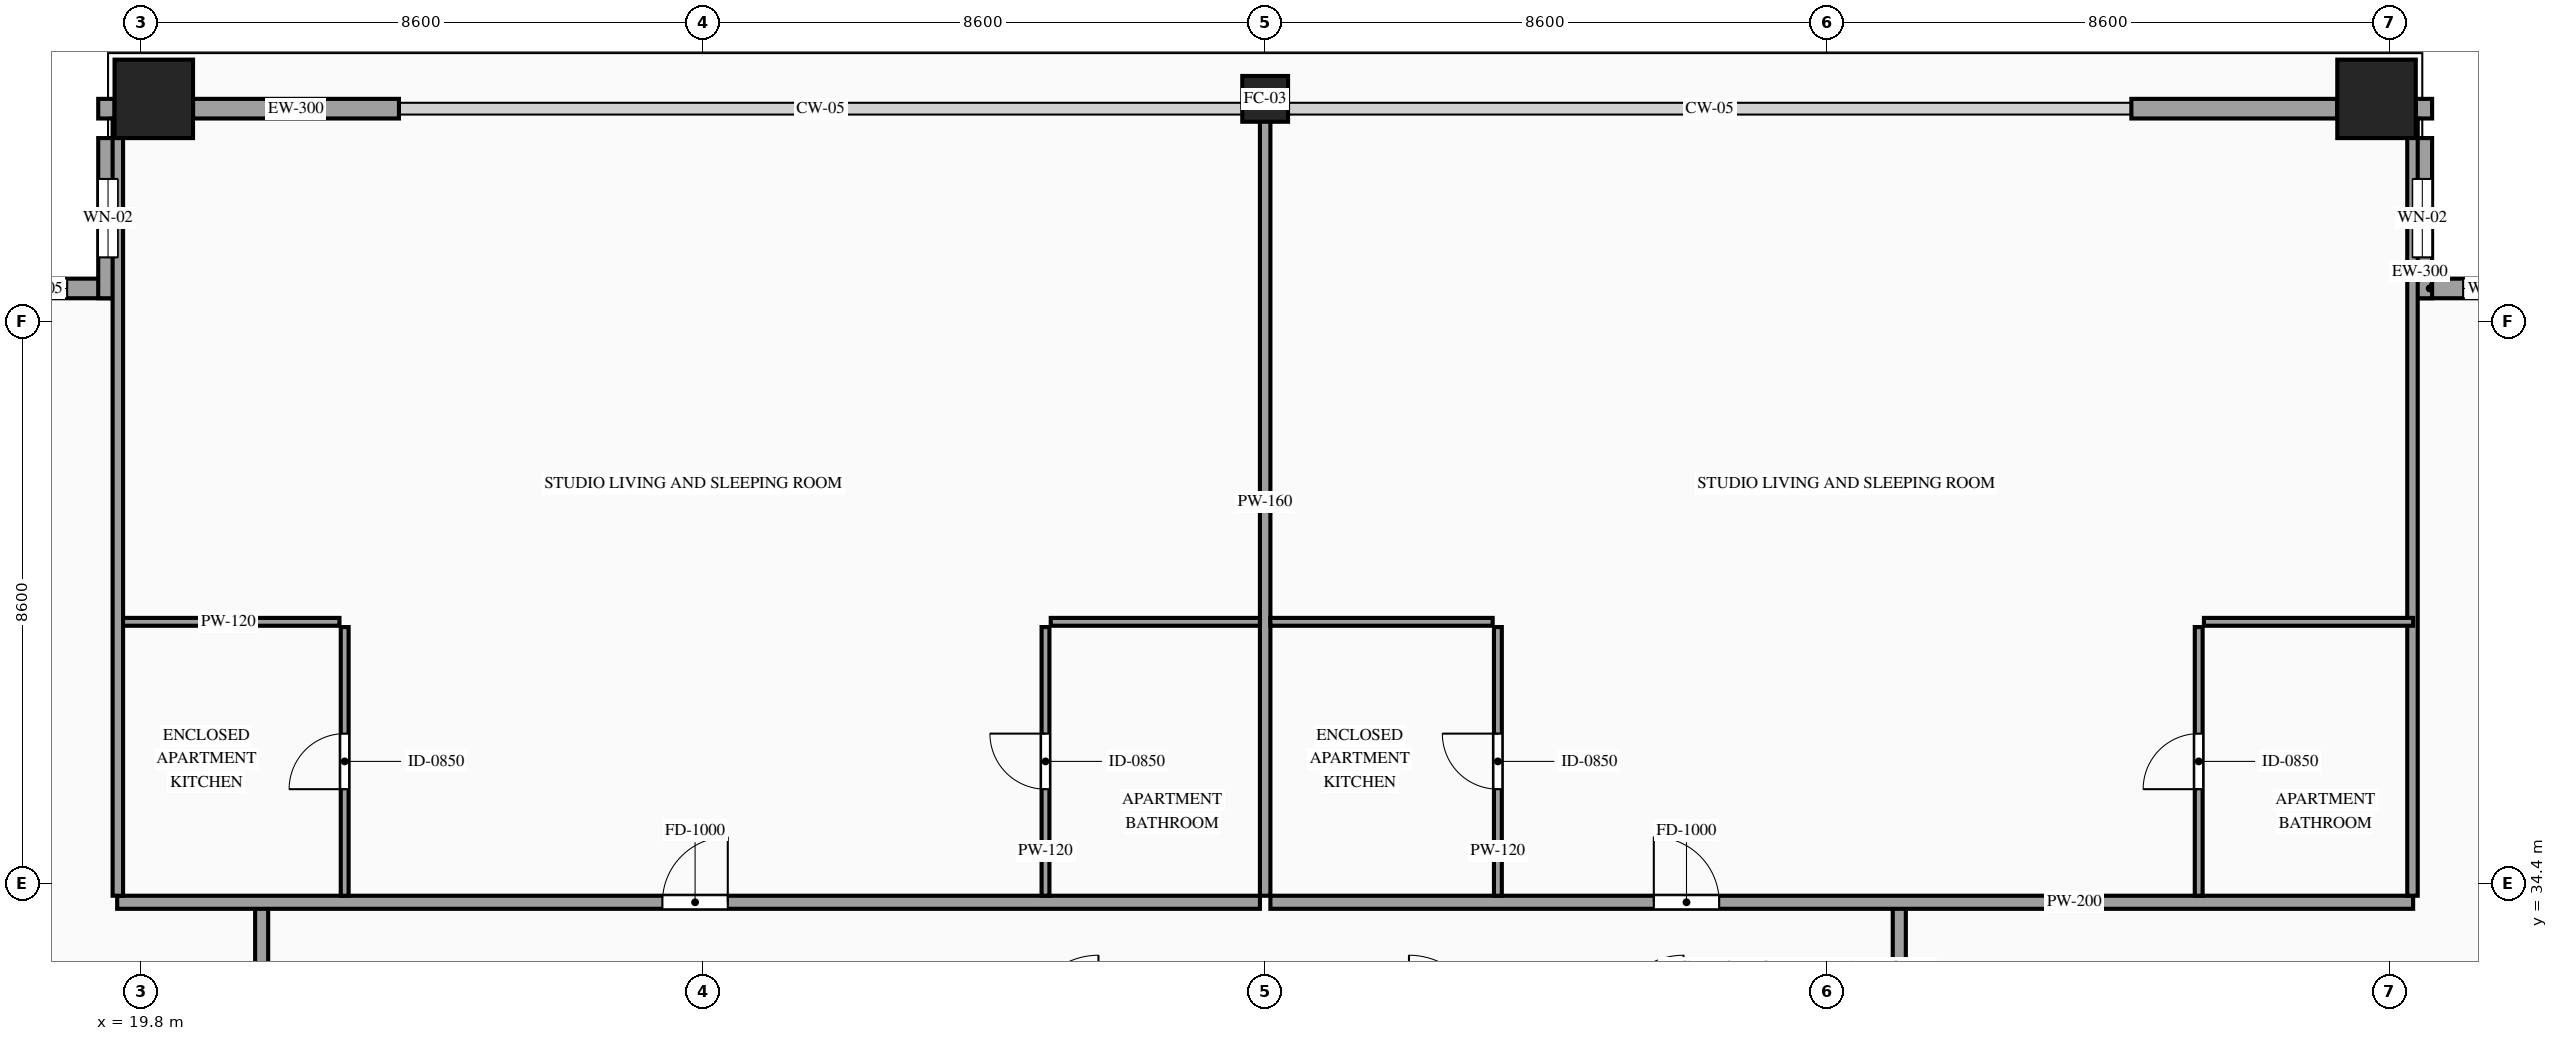
"""IFC4 building model, lengths in metres.
Left out: names, types, materials, properties, quantities, classifications, styles, units other than length and angle.
Written with IfcOpenShell. Run it as: python <this file> out.ifc"""

import sys

from ifc_helpers import new_model, si_unit, direction, frame, frame_2d, origin, origin_2d, place, context, subcontext, project, spatial, rectangle, hollow_rectangle, extrude, source, transform, mapped, element, fill, save


model = new_model("IFC4")
c1 = context("Model", 3, precision=1e-05, world=origin(), true_north=direction((0.0, 1.0)))
c2 = subcontext(c1, "Body", "Model", "MODEL_VIEW")
j1 = project(units=[si_unit("LENGTHUNIT", "METRE"), si_unit("PLANEANGLEUNIT", "RADIAN")], contexts=[c1])
p1 = place(None, origin())
s1 = spatial("IfcSite", under=j1, at=p1, CompositionType="ELEMENT")
p2 = place(p1, origin())
s2 = spatial("IfcBuilding", under=s1, at=p2, CompositionType="ELEMENT")
p3 = place(p2, frame((0.0, 0.0, 271.6)))
s3 = spatial("IfcBuildingStorey", under=s2, at=p3, CompositionType="ELEMENT", Elevation=271.6)
m1 = source(origin(), c2, "Body", "SweptSolid", [
    extrude(hollow_rectangle(XDim=1.2, YDim=1.2, WallThickness=0.055, at=origin_2d()), origin(), (0.0, 0.0, 1.0), 3.5),
])
p4 = place(p3, frame((20.0, 46.4, 0.0), z_axis=(0.0, 0.0, 1.0), x_axis=(1.0, 0.0, 0.0)))
e1 = element("IfcColumn", 1, at=p4, inside=s3, PredefinedType="COLUMN", context=c2, shape_type="MappedRepresentation", body=[
    mapped(m1, transform((0.0, 0.0, 0.0), scale=1.0)),
])
m2 = source(origin(), c2, "Body", "SweptSolid", [
    extrude(hollow_rectangle(XDim=0.7, YDim=0.7, WallThickness=0.032, at=origin_2d()), origin(), (0.0, 0.0, 1.0), 3.5),
])
p5 = place(p3, frame((37.0, 46.4, 0.0), z_axis=(0.0, 0.0, 1.0), x_axis=(1.0, 0.0, 0.0)))
e2 = element("IfcColumn", 2, at=p5, inside=s3, PredefinedType="COLUMN", context=c2, shape_type="MappedRepresentation", body=[
    mapped(m2, transform((0.0, 0.0, 0.0), scale=1.0)),
])
p6 = place(p3, frame((54.0, 46.4, 0.0), z_axis=(0.0, 0.0, 1.0), x_axis=(1.0, 0.0, 0.0)))
e3 = element("IfcColumn", 3, at=p6, inside=s3, PredefinedType="COLUMN", context=c2, shape_type="MappedRepresentation", body=[
    mapped(m1, transform((0.0, 0.0, 0.0), scale=1.0)),
])
p7 = place(p3, frame((19.45, 43.5, 0.0), z_axis=(0.0, 0.0, 1.0), x_axis=(-1.0, 0.0, 0.0)))
e4 = element("IfcWall", 4, at=p7, inside=s3, PredefinedType="SOLIDWALL", context=c2, shape_type="SweptSolid", body=[
    extrude(rectangle(XDim=2.45, YDim=0.3, at=frame_2d((1.225, 0.0))), origin(), (0.0, 0.0, 1.0), 3.28),
])
p8 = place(p7, frame((0.775, 0.0, 0.85)))
e5 = element("IfcOpeningElement", 5, at=p8, cuts=e4, PredefinedType="OPENING", context=c2, shape_type="SweptSolid", body=[
    extrude(rectangle(XDim=0.9, YDim=1.5, at=frame_2d((0.45, 0.75))), frame((0.0, 0.165, 0.0), z_axis=(0.0, -1.0, 0.0), x_axis=(1.0, 0.0, 0.0)), (0.0, 0.0, 1.0), 0.33),
])
p9 = place(p3, frame((19.3, 45.8, 0.0), z_axis=(0.0, 0.0, 1.0), x_axis=(0.0, -1.0, 0.0)))
e6 = element("IfcWall", 6, at=p9, inside=s3, PredefinedType="SOLIDWALL", context=c2, shape_type="SweptSolid", body=[
    extrude(rectangle(XDim=2.45, YDim=0.3, at=frame_2d((1.225, 0.0))), origin(), (0.0, 0.0, 1.0), 3.28),
])
p10 = place(p9, frame((0.625, 0.0, 0.85)))
e7 = element("IfcOpeningElement", 7, at=p10, cuts=e6, PredefinedType="OPENING", context=c2, shape_type="SweptSolid", body=[
    extrude(rectangle(XDim=1.2, YDim=2.1, at=frame_2d((0.6, 1.05))), frame((0.0, 0.165, 0.0), z_axis=(0.0, -1.0, 0.0), x_axis=(1.0, 0.0, 0.0)), (0.0, 0.0, 1.0), 0.33),
])
p11 = place(p3, frame((57.0, 43.5, 0.0), z_axis=(0.0, 0.0, 1.0), x_axis=(-1.0, 0.0, 0.0)))
e8 = element("IfcWall", 8, at=p11, inside=s3, PredefinedType="SOLIDWALL", context=c2, shape_type="SweptSolid", body=[
    extrude(rectangle(XDim=2.45, YDim=0.3, at=frame_2d((1.225, 0.0))), origin(), (0.0, 0.0, 1.0), 3.28),
])
p12 = place(p11, frame((0.775, 0.0, 0.85)))
e9 = element("IfcOpeningElement", 9, at=p12, cuts=e8, PredefinedType="OPENING", context=c2, shape_type="SweptSolid", body=[
    extrude(rectangle(XDim=0.9, YDim=1.5, at=frame_2d((0.45, 0.75))), frame((0.0, 0.165, 0.0), z_axis=(0.0, -1.0, 0.0), x_axis=(1.0, 0.0, 0.0)), (0.0, 0.0, 1.0), 0.33),
])
p13 = place(p3, frame((54.7, 43.35, 0.0), z_axis=(0.0, 0.0, 1.0), x_axis=(0.0, 1.0, 0.0)))
e10 = element("IfcWall", 10, at=p13, inside=s3, PredefinedType="SOLIDWALL", context=c2, shape_type="SweptSolid", body=[
    extrude(rectangle(XDim=2.45, YDim=0.3, at=frame_2d((1.225, 0.0))), origin(), (0.0, 0.0, 1.0), 3.28),
])
p14 = place(p13, frame((0.625, 0.0, 0.85)))
e11 = element("IfcOpeningElement", 11, at=p14, cuts=e10, PredefinedType="OPENING", context=c2, shape_type="SweptSolid", body=[
    extrude(rectangle(XDim=1.2, YDim=2.1, at=frame_2d((0.6, 1.05))), frame((0.0, 0.165, 0.0), z_axis=(0.0, -1.0, 0.0), x_axis=(1.0, 0.0, 0.0)), (0.0, 0.0, 1.0), 0.33),
])
m3 = source(origin(), c2, "Body", "SweptSolid", [
    extrude(rectangle(XDim=0.25, YDim=0.3, at=frame_2d((0.125, 0.0))), origin(), (0.0, 0.0, 1.0), 3.28),
])
for number, where, z_axis, x_axis in (
    (12, (19.15, 46.25, 0.0), (0.0, 0.0, 1.0), (1.0, 0.0, 0.0)),
    (13, (54.6, 46.25, 0.0), (0.0, 0.0, 1.0), (1.0, 0.0, 0.0)),
):
    element("IfcWall", number, at=place(p3, frame(where, z_axis=z_axis, x_axis=x_axis)), inside=s3, PredefinedType="SOLIDWALL", context=c2, shape_type="MappedRepresentation", body=[
        mapped(m3, transform((0.0, 0.0, 0.0), scale=1.0)),
    ])
m4 = source(origin(), c2, "Body", "SweptSolid", [
    extrude(rectangle(XDim=3.15, YDim=0.3, at=frame_2d((1.575, 0.0))), origin(), (0.0, 0.0, 1.0), 2.835),
])
for number, where, z_axis, x_axis in (
    (14, (20.6, 46.25, 0.0), (0.0, 0.0, 1.0), (1.0, 0.0, 0.0)),
    (15, (50.25, 46.25, 0.0), (0.0, 0.0, 1.0), (1.0, 0.0, 0.0)),
):
    element("IfcWall", number, at=place(p3, frame(where, z_axis=z_axis, x_axis=x_axis)), inside=s3, PredefinedType="SOLIDWALL", context=c2, shape_type="MappedRepresentation", body=[
        mapped(m4, transform((0.0, 0.0, 0.0), scale=1.0)),
    ])
m5 = source(origin(), c2, "Body", "SweptSolid", [
    extrude(rectangle(XDim=1.7, YDim=0.2, at=frame_2d((0.85, 0.0))), origin(), (0.0, 0.0, 1.0), 3.28),
])
for number, where, z_axis, x_axis in (
    (16, (21.65, 32.35, 0.0), (0.0, 0.0, 1.0), (0.0, 1.0, 0.0)),
    (17, (46.7, 32.35, 0.0), (0.0, 0.0, 1.0), (0.0, 1.0, 0.0)),
):
    element("IfcWall", number, at=place(p3, frame(where, z_axis=z_axis, x_axis=x_axis)), inside=s3, PredefinedType="PARTITIONING", context=c2, shape_type="MappedRepresentation", body=[
        mapped(m5, transform((0.0, 0.0, 0.0), scale=1.0)),
    ])
p15 = place(p3, frame((19.44, 34.11, 0.0), z_axis=(0.0, 0.0, 1.0), x_axis=(1.0, 0.0, 0.0)))
e18 = element("IfcWall", 18, at=p15, inside=s3, PredefinedType="PARTITIONING", context=c2, shape_type="SweptSolid", body=[
    extrude(rectangle(XDim=17.48, YDim=0.2, at=frame_2d((8.74, 0.0))), origin(), (0.0, 0.0, 1.0), 3.28),
])
p16 = place(p15, frame((8.34, 0.0, 0.0)))
e19 = element("IfcOpeningElement", 19, at=p16, cuts=e18, PredefinedType="OPENING", context=c2, shape_type="SweptSolid", body=[
    extrude(rectangle(XDim=1.0, YDim=2.2, at=frame_2d((0.5, 1.1))), frame((0.0, 0.115, 0.0), z_axis=(0.0, -1.0, 0.0), x_axis=(1.0, 0.0, 0.0)), (0.0, 0.0, 1.0), 0.23),
])
m6 = source(origin(), c2, "Body", "SweptSolid", [
    extrude(rectangle(XDim=12.04, YDim=0.16, at=frame_2d((6.02, 0.0))), origin(), (0.0, 0.0, 1.0), 2.787),
])
p17 = place(p3, frame((37.0, 34.21, 0.0), z_axis=(0.0, 0.0, 1.0), x_axis=(0.0, 1.0, 0.0)))
e20 = element("IfcWall", 20, at=p17, inside=s3, PredefinedType="PARTITIONING", context=c2, shape_type="MappedRepresentation", body=[
    mapped(m6, transform((0.0, 0.0, 0.0), scale=1.0)),
])
m7 = source(origin(), c2, "Body", "SweptSolid", [
    extrude(rectangle(XDim=3.4, YDim=0.12, at=frame_2d((1.7, 0.0))), origin(), (0.0, 0.0, 1.0), 3.28),
])
p18 = place(p3, frame((19.44, 38.4, 0.0), z_axis=(0.0, 0.0, 1.0), x_axis=(1.0, 0.0, 0.0)))
e21 = element("IfcWall", 21, at=p18, inside=s3, PredefinedType="PARTITIONING", context=c2, shape_type="MappedRepresentation", body=[
    mapped(m7, transform((0.0, 0.0, 0.0), scale=1.0)),
])
p19 = place(p3, frame((22.92, 34.21, 0.0), z_axis=(0.0, 0.0, 1.0), x_axis=(0.0, 1.0, 0.0)))
e22 = element("IfcWall", 22, at=p19, inside=s3, PredefinedType="PARTITIONING", context=c2, shape_type="SweptSolid", body=[
    extrude(rectangle(XDim=4.11, YDim=0.12, at=frame_2d((2.055, 0.0))), origin(), (0.0, 0.0, 1.0), 3.28),
])
p20 = place(p19, frame((1.63, 0.0, 0.0)))
e23 = element("IfcOpeningElement", 23, at=p20, cuts=e22, PredefinedType="OPENING", context=c2, shape_type="SweptSolid", body=[
    extrude(rectangle(XDim=0.85, YDim=2.1, at=frame_2d((0.425, 1.05))), frame((0.0, 0.075, 0.0), z_axis=(0.0, -1.0, 0.0), x_axis=(1.0, 0.0, 0.0)), (0.0, 0.0, 1.0), 0.15),
])
m8 = source(origin(), c2, "Body", "SweptSolid", [
    extrude(rectangle(XDim=3.2, YDim=0.12, at=frame_2d((1.6, 0.0))), origin(), (0.0, 0.0, 1.0), 3.28),
])
p21 = place(p3, frame((33.72, 38.4, 0.0), z_axis=(0.0, 0.0, 1.0), x_axis=(1.0, 0.0, 0.0)))
e24 = element("IfcWall", 24, at=p21, inside=s3, PredefinedType="PARTITIONING", context=c2, shape_type="MappedRepresentation", body=[
    mapped(m8, transform((0.0, 0.0, 0.0), scale=1.0)),
])
p22 = place(p3, frame((33.64, 34.21, 0.0), z_axis=(0.0, 0.0, 1.0), x_axis=(0.0, 1.0, 0.0)))
e25 = element("IfcWall", 25, at=p22, inside=s3, PredefinedType="PARTITIONING", context=c2, shape_type="SweptSolid", body=[
    extrude(rectangle(XDim=4.11, YDim=0.12, at=frame_2d((2.055, 0.0))), origin(), (0.0, 0.0, 1.0), 3.28),
])
p23 = place(p22, frame((1.63, 0.0, 0.0)))
e26 = element("IfcOpeningElement", 26, at=p23, cuts=e25, PredefinedType="OPENING", context=c2, shape_type="SweptSolid", body=[
    extrude(rectangle(XDim=0.85, YDim=2.1, at=frame_2d((0.425, 1.05))), frame((0.0, 0.075, 0.0), z_axis=(0.0, -1.0, 0.0), x_axis=(1.0, 0.0, 0.0)), (0.0, 0.0, 1.0), 0.15),
])
p24 = place(p3, frame((37.08, 34.11, 0.0), z_axis=(0.0, 0.0, 1.0), x_axis=(1.0, 0.0, 0.0)))
e27 = element("IfcWall", 27, at=p24, inside=s3, PredefinedType="PARTITIONING", context=c2, shape_type="SweptSolid", body=[
    extrude(rectangle(XDim=17.48, YDim=0.2, at=frame_2d((8.74, 0.0))), origin(), (0.0, 0.0, 1.0), 3.28),
])
p25 = place(p24, frame((5.865, 0.0, 0.0)))
e28 = element("IfcOpeningElement", 28, at=p25, cuts=e27, PredefinedType="OPENING", context=c2, shape_type="SweptSolid", body=[
    extrude(rectangle(XDim=1.0, YDim=2.2, at=frame_2d((0.5, 1.1))), frame((0.0, 0.115, 0.0), z_axis=(0.0, -1.0, 0.0), x_axis=(1.0, 0.0, 0.0)), (0.0, 0.0, 1.0), 0.23),
])
m9 = source(origin(), c2, "Body", "SweptSolid", [
    extrude(rectangle(XDim=11.89, YDim=0.16, at=frame_2d((5.945, 0.0))), origin(), (0.0, 0.0, 1.0), 3.28),
])
for number, where, z_axis, x_axis in (
    (29, (19.45, 34.21, 0.0), (0.0, 0.0, 1.0), (0.0, 1.0, 0.0)),
    (30, (54.55, 34.21, 0.0), (0.0, 0.0, 1.0), (0.0, 1.0, 0.0)),
):
    element("IfcWall", number, at=place(p3, frame(where, z_axis=z_axis, x_axis=x_axis)), inside=s3, PredefinedType="PARTITIONING", context=c2, shape_type="MappedRepresentation", body=[
        mapped(m9, transform((0.0, 0.0, 0.0), scale=1.0)),
    ])
m10 = source(origin(), c2, "Body", "SweptSolid", [
    extrude(rectangle(XDim=3.4, YDim=0.12, at=frame_2d((1.7, 0.0))), origin(), (0.0, 0.0, 1.0), 3.28),
])
p26 = place(p3, frame((37.08, 38.4, 0.0), z_axis=(0.0, 0.0, 1.0), x_axis=(1.0, 0.0, 0.0)))
e31 = element("IfcWall", 31, at=p26, inside=s3, PredefinedType="PARTITIONING", context=c2, shape_type="MappedRepresentation", body=[
    mapped(m10, transform((0.0, 0.0, 0.0), scale=1.0)),
])
p27 = place(p3, frame((40.56, 34.21, 0.0), z_axis=(0.0, 0.0, 1.0), x_axis=(0.0, 1.0, 0.0)))
e32 = element("IfcWall", 32, at=p27, inside=s3, PredefinedType="PARTITIONING", context=c2, shape_type="SweptSolid", body=[
    extrude(rectangle(XDim=4.11, YDim=0.12, at=frame_2d((2.055, 0.0))), origin(), (0.0, 0.0, 1.0), 3.28),
])
p28 = place(p27, frame((1.63, 0.0, 0.0)))
e33 = element("IfcOpeningElement", 33, at=p28, cuts=e32, PredefinedType="OPENING", context=c2, shape_type="SweptSolid", body=[
    extrude(rectangle(XDim=0.85, YDim=2.1, at=frame_2d((0.425, 1.05))), frame((0.0, 0.075, 0.0), z_axis=(0.0, -1.0, 0.0), x_axis=(1.0, 0.0, 0.0)), (0.0, 0.0, 1.0), 0.15),
])
p29 = place(p3, frame((51.36, 38.4, 0.0), z_axis=(0.0, 0.0, 1.0), x_axis=(1.0, 0.0, 0.0)))
e34 = element("IfcWall", 34, at=p29, inside=s3, PredefinedType="PARTITIONING", context=c2, shape_type="MappedRepresentation", body=[
    mapped(m8, transform((0.0, 0.0, 0.0), scale=1.0)),
])
p30 = place(p3, frame((51.28, 34.21, 0.0), z_axis=(0.0, 0.0, 1.0), x_axis=(0.0, 1.0, 0.0)))
e35 = element("IfcWall", 35, at=p30, inside=s3, PredefinedType="PARTITIONING", context=c2, shape_type="SweptSolid", body=[
    extrude(rectangle(XDim=4.11, YDim=0.12, at=frame_2d((2.055, 0.0))), origin(), (0.0, 0.0, 1.0), 3.28),
])
p31 = place(p30, frame((1.63, 0.0, 0.0)))
e36 = element("IfcOpeningElement", 36, at=p31, cuts=e35, PredefinedType="OPENING", context=c2, shape_type="SweptSolid", body=[
    extrude(rectangle(XDim=0.85, YDim=2.1, at=frame_2d((0.425, 1.05))), frame((0.0, 0.075, 0.0), z_axis=(0.0, -1.0, 0.0), x_axis=(1.0, 0.0, 0.0)), (0.0, 0.0, 1.0), 0.15),
])
m11 = source(origin(), c2, "Body", "SweptSolid", [
    extrude(rectangle(XDim=0.9, YDim=1.5, at=frame_2d((0.45, 0.75))), frame((0.0, 0.03, 0.0), z_axis=(0.0, -1.0, 0.0), x_axis=(1.0, 0.0, 0.0)), (0.0, 0.0, 1.0), 0.06),
])
p32 = place(p8, origin())
e37 = element("IfcWindow", 37, at=p32, inside=s3, PartitioningType="SINGLE_PANEL", PredefinedType="WINDOW", context=c2, shape_type="MappedRepresentation", body=[
    mapped(m11, transform((0.0, 0.0, 0.0), scale=1.0)),
])
fill(e5, e37)
m12 = source(origin(), c2, "Body", "SweptSolid", [
    extrude(rectangle(XDim=1.2, YDim=2.1, at=frame_2d((0.6, 1.05))), frame((0.0, 0.03, 0.0), z_axis=(0.0, -1.0, 0.0), x_axis=(1.0, 0.0, 0.0)), (0.0, 0.0, 1.0), 0.06),
])
p33 = place(p10, origin())
e38 = element("IfcWindow", 38, at=p33, inside=s3, PartitioningType="SINGLE_PANEL", PredefinedType="WINDOW", context=c2, shape_type="MappedRepresentation", body=[
    mapped(m12, transform((0.0, 0.0, 0.0), scale=1.0)),
])
fill(e7, e38)
p34 = place(p12, origin())
e39 = element("IfcWindow", 39, at=p34, inside=s3, PartitioningType="SINGLE_PANEL", PredefinedType="WINDOW", context=c2, shape_type="MappedRepresentation", body=[
    mapped(m11, transform((0.0, 0.0, 0.0), scale=1.0)),
])
fill(e9, e39)
p35 = place(p14, origin())
e40 = element("IfcWindow", 40, at=p35, inside=s3, PartitioningType="SINGLE_PANEL", PredefinedType="WINDOW", context=c2, shape_type="MappedRepresentation", body=[
    mapped(m12, transform((0.0, 0.0, 0.0), scale=1.0)),
])
fill(e11, e40)
m13 = source(origin(), c2, "Body", "SweptSolid", [
    extrude(rectangle(XDim=1.0, YDim=2.2, at=frame_2d((0.5, 1.1))), frame((0.0, 0.025, 0.0), z_axis=(0.0, -1.0, 0.0), x_axis=(1.0, 0.0, 0.0)), (0.0, 0.0, 1.0), 0.05),
])
p36 = place(p16, origin())
e41 = element("IfcDoor", 41, at=p36, inside=s3, OperationType="SINGLE_SWING_RIGHT", PredefinedType="DOOR", context=c2, shape_type="MappedRepresentation", body=[
    mapped(m13, transform((0.0, 0.0, 0.0), scale=1.0)),
])
fill(e19, e41)
m14 = source(origin(), c2, "Body", "SweptSolid", [
    extrude(rectangle(XDim=0.85, YDim=2.1, at=frame_2d((0.425, 1.05))), frame((0.0, 0.025, 0.0), z_axis=(0.0, -1.0, 0.0), x_axis=(1.0, 0.0, 0.0)), (0.0, 0.0, 1.0), 0.05),
])
p37 = place(p20, origin())
e42 = element("IfcDoor", 42, at=p37, inside=s3, OperationType="SINGLE_SWING_LEFT", PredefinedType="DOOR", context=c2, shape_type="MappedRepresentation", body=[
    mapped(m14, transform((0.0, 0.0, 0.0), scale=1.0)),
])
fill(e23, e42)
p38 = place(p23, origin())
e43 = element("IfcDoor", 43, at=p38, inside=s3, OperationType="SINGLE_SWING_RIGHT", PredefinedType="DOOR", context=c2, shape_type="MappedRepresentation", body=[
    mapped(m14, transform((0.0, 0.0, 0.0), scale=1.0)),
])
fill(e26, e43)
p39 = place(p25, origin())
e44 = element("IfcDoor", 44, at=p39, inside=s3, OperationType="SINGLE_SWING_LEFT", PredefinedType="DOOR", context=c2, shape_type="MappedRepresentation", body=[
    mapped(m13, transform((0.0, 0.0, 0.0), scale=1.0)),
])
fill(e28, e44)
p40 = place(p28, origin())
e45 = element("IfcDoor", 45, at=p40, inside=s3, OperationType="SINGLE_SWING_RIGHT", PredefinedType="DOOR", context=c2, shape_type="MappedRepresentation", body=[
    mapped(m14, transform((0.0, 0.0, 0.0), scale=1.0)),
])
fill(e33, e45)
p41 = place(p31, origin())
e46 = element("IfcDoor", 46, at=p41, inside=s3, OperationType="SINGLE_SWING_LEFT", PredefinedType="DOOR", context=c2, shape_type="MappedRepresentation", body=[
    mapped(m14, transform((0.0, 0.0, 0.0), scale=1.0)),
])
fill(e36, e46)
save(model, sys.argv[1])
